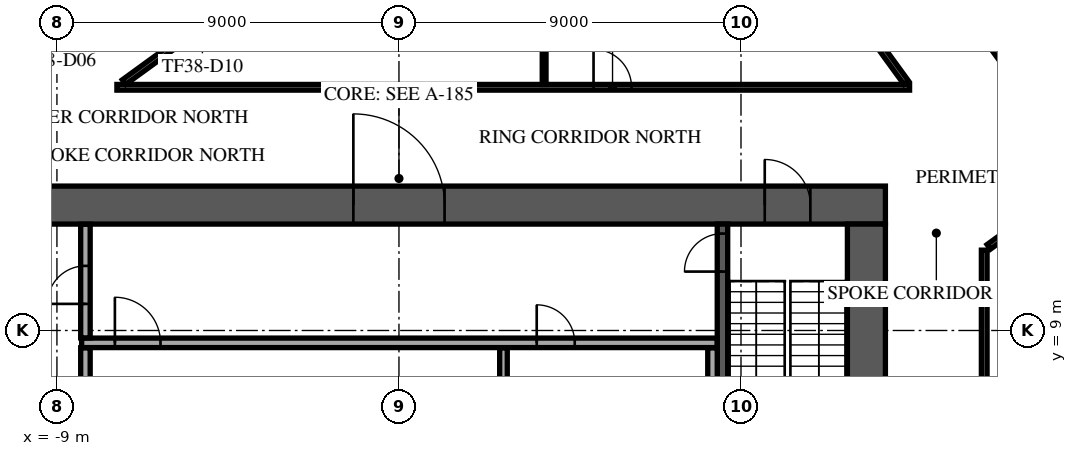
"""IFC4 building model, lengths in metres.
Left out: names, types, materials, properties, quantities, classifications, styles, units other than length and angle.
Written with IfcOpenShell. Run it as: python <this file> out.ifc"""

import sys

from ifc_helpers import new_model, si_unit, direction, frame, frame_2d, origin, place, context, subcontext, project, spatial, rectangle, extrude, element, fill, save


model = new_model("IFC4")
c1 = context("Model", 3, precision=1e-05, world=origin(), true_north=direction((0.0, 1.0)))
c2 = subcontext(c1, "Body", "Model", "MODEL_VIEW")
j1 = project(units=[si_unit("LENGTHUNIT", "METRE"), si_unit("PLANEANGLEUNIT", "RADIAN")], contexts=[c1])
p1 = place(None, origin())
s1 = spatial("IfcSite", under=j1, at=p1, CompositionType="ELEMENT")
p2 = place(p1, origin())
s2 = spatial("IfcBuilding", under=s1, at=p2, CompositionType="ELEMENT")
p3 = place(p2, frame((0.0, 0.0, 163.7)))
s3 = spatial("IfcBuildingStorey", under=s2, at=p3, CompositionType="ELEMENT", Elevation=163.7)
p4 = place(p3, frame((-12.8, 12.3, 0.0), z_axis=(0.0, 0.0, 1.0), x_axis=(1.0, 0.0, 0.0)))
e1 = element("IfcWall", 1, at=p4, inside=s3, PredefinedType="SHEAR", context=c2, shape_type="SweptSolid", body=[
    extrude(rectangle(XDim=25.6, YDim=1.0, at=frame_2d((12.8, 0.0))), origin(), (0.0, 0.0, 1.0), 3.6),
])
p5 = place(p4, frame((11.6, 0.0, 0.0)))
e2 = element("IfcOpeningElement", 2, at=p5, cuts=e1, PredefinedType="OPENING", context=c2, shape_type="SweptSolid", body=[
    extrude(rectangle(XDim=2.4, YDim=2.4, at=frame_2d((1.2, 1.2))), frame((0.0, 0.51, 0.0), z_axis=(0.0, -1.0, 0.0), x_axis=(1.0, 0.0, 0.0)), (0.0, 0.0, 1.0), 1.02),
])
p6 = place(p4, frame((22.425, 0.0, 0.0)))
e3 = element("IfcOpeningElement", 3, at=p6, cuts=e1, PredefinedType="OPENING", context=c2, shape_type="SweptSolid", body=[
    extrude(rectangle(XDim=1.2, YDim=2.1, at=frame_2d((0.6, 1.05))), frame((0.0, 0.51, 0.0), z_axis=(0.0, -1.0, 0.0), x_axis=(1.0, 0.0, 0.0)), (0.0, 0.0, 1.0), 1.02),
])
p7 = place(p4, frame((1.4, 0.0, 0.0)))
e4 = element("IfcOpeningElement", 4, at=p7, cuts=e1, PredefinedType="OPENING", context=c2, shape_type="SweptSolid", body=[
    extrude(rectangle(XDim=1.0, YDim=2.1, at=frame_2d((0.5, 1.05))), frame((0.0, 0.51, 0.0), z_axis=(0.0, -1.0, 0.0), x_axis=(1.0, 0.0, 0.0)), (0.0, 0.0, 1.0), 1.02),
])
p8 = place(p3, frame((12.3, -11.8, 0.0), z_axis=(0.0, 0.0, 1.0), x_axis=(0.0, 1.0, 0.0)))
e5 = element("IfcWall", 5, at=p8, inside=s3, PredefinedType="SHEAR", context=c2, shape_type="SweptSolid", body=[
    extrude(rectangle(XDim=23.6, YDim=1.0, at=frame_2d((11.8, 0.0))), origin(), (0.0, 0.0, 1.0), 3.6),
])
p9 = place(p8, frame((10.6, 0.0, 0.0)))
e6 = element("IfcOpeningElement", 6, at=p9, cuts=e5, PredefinedType="OPENING", context=c2, shape_type="SweptSolid", body=[
    extrude(rectangle(XDim=2.4, YDim=2.4, at=frame_2d((1.2, 1.2))), frame((0.0, 0.51, 0.0), z_axis=(0.0, -1.0, 0.0), x_axis=(1.0, 0.0, 0.0)), (0.0, 0.0, 1.0), 1.02),
])
p10 = place(p3, frame((8.512, 4.55, 0.0), z_axis=(0.0, 0.0, 1.0), x_axis=(0.0, 1.0, 0.0)))
e7 = element("IfcWall", 7, at=p10, inside=s3, PredefinedType="SOLIDWALL", context=c2, shape_type="SweptSolid", body=[
    extrude(rectangle(XDim=7.25, YDim=0.275, at=frame_2d((3.625, 0.0))), origin(), (0.0, 0.0, 1.0), 3.6),
])
p11 = place(p10, frame((6.0, 0.0, 0.0)))
e8 = element("IfcOpeningElement", 8, at=p11, cuts=e7, PredefinedType="OPENING", context=c2, shape_type="SweptSolid", body=[
    extrude(rectangle(XDim=1.0, YDim=2.1, at=frame_2d((0.5, 1.05))), frame((0.0, 0.147, 0.0), z_axis=(0.0, -1.0, 0.0), x_axis=(1.0, 0.0, 0.0)), (0.0, 0.0, 1.0), 0.295),
])
p12 = place(p3, frame((-8.25, 5.855, 0.0), z_axis=(0.0, 0.0, 1.0), x_axis=(0.0, 1.0, 0.0)))
e9 = element("IfcWall", 9, at=p12, inside=s3, PredefinedType="PARTITIONING", context=c2, shape_type="SweptSolid", body=[
    extrude(rectangle(XDim=2.69, YDim=0.25, at=frame_2d((1.345, 0.0))), origin(), (0.0, 0.0, 1.0), 3.6),
])
p13 = place(p3, frame((2.75, 5.855, 0.0), z_axis=(0.0, 0.0, 1.0), x_axis=(0.0, 1.0, 0.0)))
e10 = element("IfcWall", 10, at=p13, inside=s3, PredefinedType="PARTITIONING", context=c2, shape_type="SweptSolid", body=[
    extrude(rectangle(XDim=2.69, YDim=0.2, at=frame_2d((1.345, 0.0))), origin(), (0.0, 0.0, 1.0), 3.6),
])
p14 = place(p3, frame((8.25, 5.855, 0.0), z_axis=(0.0, 0.0, 1.0), x_axis=(0.0, 1.0, 0.0)))
e11 = element("IfcWall", 11, at=p14, inside=s3, PredefinedType="PARTITIONING", context=c2, shape_type="SweptSolid", body=[
    extrude(rectangle(XDim=2.69, YDim=0.25, at=frame_2d((1.345, 0.0))), origin(), (0.0, 0.0, 1.0), 3.6),
])
p15 = place(p3, frame((-8.35, 8.675, 0.0), z_axis=(0.0, 0.0, 1.0), x_axis=(1.0, 0.0, 0.0)))
e12 = element("IfcWall", 12, at=p15, inside=s3, PredefinedType="PARTITIONING", context=c2, shape_type="SweptSolid", body=[
    extrude(rectangle(XDim=16.72, YDim=0.25, at=frame_2d((8.36, 0.0))), origin(), (0.0, 0.0, 1.0), 3.6),
])
p16 = place(p15, frame((0.875, 0.0, 0.0)))
e13 = element("IfcOpeningElement", 13, at=p16, cuts=e12, PredefinedType="OPENING", context=c2, shape_type="SweptSolid", body=[
    extrude(rectangle(XDim=1.2, YDim=2.1, at=frame_2d((0.6, 1.05))), frame((0.0, 0.135, 0.0), z_axis=(0.0, -1.0, 0.0), x_axis=(1.0, 0.0, 0.0)), (0.0, 0.0, 1.0), 0.27),
])
p17 = place(p15, frame((11.975, 0.0, 0.0)))
e14 = element("IfcOpeningElement", 14, at=p17, cuts=e12, PredefinedType="OPENING", context=c2, shape_type="SweptSolid", body=[
    extrude(rectangle(XDim=1.0, YDim=2.1, at=frame_2d((0.5, 1.05))), frame((0.0, 0.135, 0.0), z_axis=(0.0, -1.0, 0.0), x_axis=(1.0, 0.0, 0.0)), (0.0, 0.0, 1.0), 0.27),
])
p18 = place(p3, frame((-8.25, 8.805, 0.0), z_axis=(0.0, 0.0, 1.0), x_axis=(0.0, 1.0, 0.0)))
e15 = element("IfcWall", 15, at=p18, inside=s3, PredefinedType="PARTITIONING", context=c2, shape_type="SweptSolid", body=[
    extrude(rectangle(XDim=2.99, YDim=0.25, at=frame_2d((1.495, 0.0))), origin(), (0.0, 0.0, 1.0), 3.6),
])
p19 = place(p18, frame((0.895, 0.0, 0.0)))
e16 = element("IfcOpeningElement", 16, at=p19, cuts=e15, PredefinedType="OPENING", context=c2, shape_type="SweptSolid", body=[
    extrude(rectangle(XDim=1.0, YDim=2.1, at=frame_2d((0.5, 1.05))), frame((0.0, 0.135, 0.0), z_axis=(0.0, -1.0, 0.0), x_axis=(1.0, 0.0, 0.0)), (0.0, 0.0, 1.0), 0.27),
])
p20 = place(p3, frame((4.48, 35.516, 0.0), z_axis=(0.0, 0.0, 1.0), x_axis=(-0.809018017995, -0.587783843398, 0.0)))
e17 = element("IfcWall", 17, at=p20, inside=s3, PredefinedType="STANDARD", context=c2, shape_type="SweptSolid", body=[
    extrude(rectangle(XDim=49.376, YDim=0.6, at=frame_2d((24.688, 0.0))), origin(), (0.0, 0.0, 1.0), 3.6),
])
p21 = place(p20, frame((1.2, 0.0, 0.9)))
e18 = element("IfcOpeningElement", 18, at=p21, cuts=e17, PredefinedType="OPENING", context=c2, shape_type="SweptSolid", body=[
    extrude(rectangle(XDim=2.1, YDim=2.1, at=frame_2d((1.05, 1.05))), frame((0.0, 0.31, 0.0), z_axis=(0.0, -1.0, 0.0), x_axis=(1.0, 0.0, 0.0)), (0.0, 0.0, 1.0), 0.62),
])
p22 = place(p20, frame((5.7, 0.0, 0.9)))
e19 = element("IfcOpeningElement", 19, at=p22, cuts=e17, PredefinedType="OPENING", context=c2, shape_type="SweptSolid", body=[
    extrude(rectangle(XDim=2.1, YDim=2.1, at=frame_2d((1.05, 1.05))), frame((0.0, 0.31, 0.0), z_axis=(0.0, -1.0, 0.0), x_axis=(1.0, 0.0, 0.0)), (0.0, 0.0, 1.0), 0.62),
])
p23 = place(p20, frame((10.2, 0.0, 0.9)))
e20 = element("IfcOpeningElement", 20, at=p23, cuts=e17, PredefinedType="OPENING", context=c2, shape_type="SweptSolid", body=[
    extrude(rectangle(XDim=2.1, YDim=2.1, at=frame_2d((1.05, 1.05))), frame((0.0, 0.31, 0.0), z_axis=(0.0, -1.0, 0.0), x_axis=(1.0, 0.0, 0.0)), (0.0, 0.0, 1.0), 0.62),
])
p24 = place(p20, frame((14.7, 0.0, 0.9)))
e21 = element("IfcOpeningElement", 21, at=p24, cuts=e17, PredefinedType="OPENING", context=c2, shape_type="SweptSolid", body=[
    extrude(rectangle(XDim=2.1, YDim=2.1, at=frame_2d((1.05, 1.05))), frame((0.0, 0.31, 0.0), z_axis=(0.0, -1.0, 0.0), x_axis=(1.0, 0.0, 0.0)), (0.0, 0.0, 1.0), 0.62),
])
p25 = place(p20, frame((19.2, 0.0, 0.9)))
e22 = element("IfcOpeningElement", 22, at=p25, cuts=e17, PredefinedType="OPENING", context=c2, shape_type="SweptSolid", body=[
    extrude(rectangle(XDim=2.1, YDim=2.1, at=frame_2d((1.05, 1.05))), frame((0.0, 0.31, 0.0), z_axis=(0.0, -1.0, 0.0), x_axis=(1.0, 0.0, 0.0)), (0.0, 0.0, 1.0), 0.62),
])
p26 = place(p20, frame((23.7, 0.0, 0.9)))
e23 = element("IfcOpeningElement", 23, at=p26, cuts=e17, PredefinedType="OPENING", context=c2, shape_type="SweptSolid", body=[
    extrude(rectangle(XDim=2.1, YDim=2.1, at=frame_2d((1.05, 1.05))), frame((0.0, 0.31, 0.0), z_axis=(0.0, -1.0, 0.0), x_axis=(1.0, 0.0, 0.0)), (0.0, 0.0, 1.0), 0.62),
])
p27 = place(p20, frame((28.2, 0.0, 0.9)))
e24 = element("IfcOpeningElement", 24, at=p27, cuts=e17, PredefinedType="OPENING", context=c2, shape_type="SweptSolid", body=[
    extrude(rectangle(XDim=2.1, YDim=2.1, at=frame_2d((1.05, 1.05))), frame((0.0, 0.31, 0.0), z_axis=(0.0, -1.0, 0.0), x_axis=(1.0, 0.0, 0.0)), (0.0, 0.0, 1.0), 0.62),
])
p28 = place(p20, frame((32.7, 0.0, 0.9)))
e25 = element("IfcOpeningElement", 25, at=p28, cuts=e17, PredefinedType="OPENING", context=c2, shape_type="SweptSolid", body=[
    extrude(rectangle(XDim=2.1, YDim=2.1, at=frame_2d((1.05, 1.05))), frame((0.0, 0.31, 0.0), z_axis=(0.0, -1.0, 0.0), x_axis=(1.0, 0.0, 0.0)), (0.0, 0.0, 1.0), 0.62),
])
p29 = place(p20, frame((37.2, 0.0, 0.9)))
e26 = element("IfcOpeningElement", 26, at=p29, cuts=e17, PredefinedType="OPENING", context=c2, shape_type="SweptSolid", body=[
    extrude(rectangle(XDim=2.1, YDim=2.1, at=frame_2d((1.05, 1.05))), frame((0.0, 0.31, 0.0), z_axis=(0.0, -1.0, 0.0), x_axis=(1.0, 0.0, 0.0)), (0.0, 0.0, 1.0), 0.62),
])
p30 = place(p20, frame((41.7, 0.0, 0.9)))
e27 = element("IfcOpeningElement", 27, at=p30, cuts=e17, PredefinedType="OPENING", context=c2, shape_type="SweptSolid", body=[
    extrude(rectangle(XDim=2.1, YDim=2.1, at=frame_2d((1.05, 1.05))), frame((0.0, 0.31, 0.0), z_axis=(0.0, -1.0, 0.0), x_axis=(1.0, 0.0, 0.0)), (0.0, 0.0, 1.0), 0.62),
])
p31 = place(p20, frame((46.138, 0.0, 0.9)))
e28 = element("IfcOpeningElement", 28, at=p31, cuts=e17, PredefinedType="OPENING", context=c2, shape_type="SweptSolid", body=[
    extrude(rectangle(XDim=2.1, YDim=2.1, at=frame_2d((1.05, 1.05))), frame((0.0, 0.31, 0.0), z_axis=(0.0, -1.0, 0.0), x_axis=(1.0, 0.0, 0.0)), (0.0, 0.0, 1.0), 0.62),
])
p32 = place(p3, frame((36.533, 0.245, 0.0), z_axis=(0.0, 0.0, 1.0), x_axis=(-0.58778579343, 0.809016601215, 0.0)))
e29 = element("IfcWall", 29, at=p32, inside=s3, PredefinedType="STANDARD", context=c2, shape_type="SweptSolid", body=[
    extrude(rectangle(XDim=42.176, YDim=0.6, at=frame_2d((21.088, 0.0))), origin(), (0.0, 0.0, 1.0), 3.6),
])
p33 = place(p32, frame((1.138, 0.0, 0.9)))
e30 = element("IfcOpeningElement", 30, at=p33, cuts=e29, PredefinedType="OPENING", context=c2, shape_type="SweptSolid", body=[
    extrude(rectangle(XDim=2.3, YDim=2.1, at=frame_2d((1.15, 1.05))), frame((0.0, 0.31, 0.0), z_axis=(0.0, -1.0, 0.0), x_axis=(1.0, 0.0, 0.0)), (0.0, 0.0, 1.0), 0.62),
])
p34 = place(p32, frame((5.776, 0.0, 0.9)))
e31 = element("IfcOpeningElement", 31, at=p34, cuts=e29, PredefinedType="OPENING", context=c2, shape_type="SweptSolid", body=[
    extrude(rectangle(XDim=2.3, YDim=2.1, at=frame_2d((1.15, 1.05))), frame((0.0, 0.31, 0.0), z_axis=(0.0, -1.0, 0.0), x_axis=(1.0, 0.0, 0.0)), (0.0, 0.0, 1.0), 0.62),
])
p35 = place(p32, frame((10.476, 0.0, 0.9)))
e32 = element("IfcOpeningElement", 32, at=p35, cuts=e29, PredefinedType="OPENING", context=c2, shape_type="SweptSolid", body=[
    extrude(rectangle(XDim=2.3, YDim=2.1, at=frame_2d((1.15, 1.05))), frame((0.0, 0.31, 0.0), z_axis=(0.0, -1.0, 0.0), x_axis=(1.0, 0.0, 0.0)), (0.0, 0.0, 1.0), 0.62),
])
p36 = place(p32, frame((15.176, 0.0, 0.9)))
e33 = element("IfcOpeningElement", 33, at=p36, cuts=e29, PredefinedType="OPENING", context=c2, shape_type="SweptSolid", body=[
    extrude(rectangle(XDim=2.3, YDim=2.1, at=frame_2d((1.15, 1.05))), frame((0.0, 0.31, 0.0), z_axis=(0.0, -1.0, 0.0), x_axis=(1.0, 0.0, 0.0)), (0.0, 0.0, 1.0), 0.62),
])
p37 = place(p32, frame((19.876, 0.0, 0.9)))
e34 = element("IfcOpeningElement", 34, at=p37, cuts=e29, PredefinedType="OPENING", context=c2, shape_type="SweptSolid", body=[
    extrude(rectangle(XDim=2.3, YDim=2.1, at=frame_2d((1.15, 1.05))), frame((0.0, 0.31, 0.0), z_axis=(0.0, -1.0, 0.0), x_axis=(1.0, 0.0, 0.0)), (0.0, 0.0, 1.0), 0.62),
])
p38 = place(p32, frame((24.576, 0.0, 0.9)))
e35 = element("IfcOpeningElement", 35, at=p38, cuts=e29, PredefinedType="OPENING", context=c2, shape_type="SweptSolid", body=[
    extrude(rectangle(XDim=2.3, YDim=2.1, at=frame_2d((1.15, 1.05))), frame((0.0, 0.31, 0.0), z_axis=(0.0, -1.0, 0.0), x_axis=(1.0, 0.0, 0.0)), (0.0, 0.0, 1.0), 0.62),
])
p39 = place(p32, frame((29.276, 0.0, 0.9)))
e36 = element("IfcOpeningElement", 36, at=p39, cuts=e29, PredefinedType="OPENING", context=c2, shape_type="SweptSolid", body=[
    extrude(rectangle(XDim=2.3, YDim=2.1, at=frame_2d((1.15, 1.05))), frame((0.0, 0.31, 0.0), z_axis=(0.0, -1.0, 0.0), x_axis=(1.0, 0.0, 0.0)), (0.0, 0.0, 1.0), 0.62),
])
p40 = place(p32, frame((33.976, 0.0, 0.9)))
e37 = element("IfcOpeningElement", 37, at=p40, cuts=e29, PredefinedType="OPENING", context=c2, shape_type="SweptSolid", body=[
    extrude(rectangle(XDim=2.3, YDim=2.1, at=frame_2d((1.15, 1.05))), frame((0.0, 0.31, 0.0), z_axis=(0.0, -1.0, 0.0), x_axis=(1.0, 0.0, 0.0)), (0.0, 0.0, 1.0), 0.62),
])
p41 = place(p32, frame((38.676, 0.0, 0.9)))
e38 = element("IfcOpeningElement", 38, at=p41, cuts=e29, PredefinedType="OPENING", context=c2, shape_type="SweptSolid", body=[
    extrude(rectangle(XDim=2.3, YDim=2.1, at=frame_2d((1.15, 1.05))), frame((0.0, 0.31, 0.0), z_axis=(0.0, -1.0, 0.0), x_axis=(1.0, 0.0, 0.0)), (0.0, 0.0, 1.0), 0.62),
])
p42 = place(p3, frame((-26.166, 4.749, 0.0), z_axis=(0.0, 0.0, 1.0), x_axis=(0.809023795939, 0.587775890628, 0.0)))
e39 = element("IfcWall", 39, at=p42, inside=s3, PredefinedType="PARTITIONING", context=c2, shape_type="SweptSolid", body=[
    extrude(rectangle(XDim=36.756, YDim=0.15, at=frame_2d((18.378, 0.0))), origin(), (0.0, 0.0, 1.0), 3.15),
])
p43 = place(p42, frame((1.8, 0.0, 0.0)))
e40 = element("IfcOpeningElement", 40, at=p43, cuts=e39, PredefinedType="OPENING", context=c2, shape_type="SweptSolid", body=[
    extrude(rectangle(XDim=1.0, YDim=2.1, at=frame_2d((0.5, 1.05))), frame((0.0, 0.085, 0.0), z_axis=(0.0, -1.0, 0.0), x_axis=(1.0, 0.0, 0.0)), (0.0, 0.0, 1.0), 0.17),
])
p44 = place(p42, frame((7.453, 0.0, 0.0)))
e41 = element("IfcOpeningElement", 41, at=p44, cuts=e39, PredefinedType="OPENING", context=c2, shape_type="SweptSolid", body=[
    extrude(rectangle(XDim=1.0, YDim=2.1, at=frame_2d((0.5, 1.05))), frame((0.0, 0.085, 0.0), z_axis=(0.0, -1.0, 0.0), x_axis=(1.0, 0.0, 0.0)), (0.0, 0.0, 1.0), 0.17),
])
p45 = place(p42, frame((20.671, 0.0, 0.0)))
e42 = element("IfcOpeningElement", 42, at=p45, cuts=e39, PredefinedType="OPENING", context=c2, shape_type="SweptSolid", body=[
    extrude(rectangle(XDim=1.0, YDim=2.1, at=frame_2d((0.5, 1.05))), frame((0.0, 0.085, 0.0), z_axis=(0.0, -1.0, 0.0), x_axis=(1.0, 0.0, 0.0)), (0.0, 0.0, 1.0), 0.17),
])
p46 = place(p42, frame((27.382, 0.0, 0.0)))
e43 = element("IfcOpeningElement", 43, at=p46, cuts=e39, PredefinedType="OPENING", context=c2, shape_type="SweptSolid", body=[
    extrude(rectangle(XDim=1.8, YDim=2.1, at=frame_2d((0.9, 1.05))), frame((0.0, 0.085, 0.0), z_axis=(0.0, -1.0, 0.0), x_axis=(1.0, 0.0, 0.0)), (0.0, 0.0, 1.0), 0.17),
])
p47 = place(p3, frame((-7.422, 15.4, 0.0), z_axis=(0.0, 0.0, 1.0), x_axis=(1.0, 0.0, 0.0)))
e44 = element("IfcWall", 44, at=p47, inside=s3, PredefinedType="PARTITIONING", context=c2, shape_type="SweptSolid", body=[
    extrude(rectangle(XDim=20.858, YDim=0.15, at=frame_2d((10.429, 0.0))), origin(), (0.0, 0.0, 1.0), 3.15),
])
p48 = place(p47, frame((12.542, 0.0, 0.0)))
e45 = element("IfcOpeningElement", 45, at=p48, cuts=e44, PredefinedType="OPENING", context=c2, shape_type="SweptSolid", body=[
    extrude(rectangle(XDim=1.0, YDim=2.1, at=frame_2d((0.5, 1.05))), frame((0.0, 0.085, 0.0), z_axis=(0.0, -1.0, 0.0), x_axis=(1.0, 0.0, 0.0)), (0.0, 0.0, 1.0), 0.17),
])
p49 = place(p3, frame((-7.235, 15.536, 0.0), z_axis=(0.0, 0.0, 1.0), x_axis=(0.809007989402, 0.587797646375, 0.0)))
e46 = element("IfcWall", 46, at=p49, inside=s3, PredefinedType="PARTITIONING", context=c2, shape_type="SweptSolid", body=[
    extrude(rectangle(XDim=15.099, YDim=0.15, at=frame_2d((7.55, 0.0))), origin(), (0.0, 0.0, 1.0), 3.15),
])
p50 = place(p49, frame((2.05, 0.0, 0.0)))
e47 = element("IfcOpeningElement", 47, at=p50, cuts=e46, PredefinedType="OPENING", context=c2, shape_type="SweptSolid", body=[
    extrude(rectangle(XDim=1.0, YDim=2.1, at=frame_2d((0.5, 1.05))), frame((0.0, 0.085, 0.0), z_axis=(0.0, -1.0, 0.0), x_axis=(1.0, 0.0, 0.0)), (0.0, 0.0, 1.0), 0.17),
])
p51 = place(p3, frame((7.739, 23.241, 0.0), z_axis=(0.0, 0.0, 1.0), x_axis=(0.587792950245, -0.809011401429, 0.0)))
e48 = element("IfcWall", 48, at=p51, inside=s3, PredefinedType="PARTITIONING", context=c2, shape_type="SweptSolid", body=[
    extrude(rectangle(XDim=9.545, YDim=0.15, at=frame_2d((4.772, 0.0))), origin(), (0.0, 0.0, 1.0), 3.15),
])
p52 = place(p3, frame((9.681, 24.652, 0.0), z_axis=(0.0, 0.0, 1.0), x_axis=(0.58776328895, -0.809032951222, 0.0)))
e49 = element("IfcWall", 49, at=p52, inside=s3, PredefinedType="PARTITIONING", context=c2, shape_type="SweptSolid", body=[
    extrude(rectangle(XDim=28.583, YDim=0.15, at=frame_2d((14.291, 0.0))), origin(), (0.0, 0.0, 1.0), 3.15),
])
p53 = place(p52, frame((12.256, 0.0, 0.0)))
e50 = element("IfcOpeningElement", 50, at=p53, cuts=e49, PredefinedType="OPENING", context=c2, shape_type="SweptSolid", body=[
    extrude(rectangle(XDim=1.0, YDim=2.1, at=frame_2d((0.5, 1.05))), frame((0.0, 0.085, 0.0), z_axis=(0.0, -1.0, 0.0), x_axis=(1.0, 0.0, 0.0)), (0.0, 0.0, 1.0), 0.17),
])
p54 = place(p3, frame((15.4, -9.457, 0.0), z_axis=(0.0, 0.0, 1.0), x_axis=(0.0, 1.0, 0.0)))
e51 = element("IfcWall", 51, at=p54, inside=s3, PredefinedType="PARTITIONING", context=c2, shape_type="SweptSolid", body=[
    extrude(rectangle(XDim=20.571, YDim=0.15, at=frame_2d((10.285, 0.0))), origin(), (0.0, 0.0, 1.0), 3.15),
])
p55 = place(p54, frame((3.55, 0.0, 0.0)))
e52 = element("IfcOpeningElement", 52, at=p55, cuts=e51, PredefinedType="OPENING", context=c2, shape_type="SweptSolid", body=[
    extrude(rectangle(XDim=1.0, YDim=2.1, at=frame_2d((0.5, 1.05))), frame((0.0, 0.085, 0.0), z_axis=(0.0, -1.0, 0.0), x_axis=(1.0, 0.0, 0.0)), (0.0, 0.0, 1.0), 0.17),
])
p56 = place(p54, frame((7.853, 0.0, 0.0)))
e53 = element("IfcOpeningElement", 53, at=p56, cuts=e51, PredefinedType="OPENING", context=c2, shape_type="SweptSolid", body=[
    extrude(rectangle(XDim=1.8, YDim=2.1, at=frame_2d((0.9, 1.05))), frame((0.0, 0.085, 0.0), z_axis=(0.0, -1.0, 0.0), x_axis=(1.0, 0.0, 0.0)), (0.0, 0.0, 1.0), 0.17),
])
p57 = place(p3, frame((15.519, 11.2, 0.0), z_axis=(0.0, 0.0, 1.0), x_axis=(0.809140088661, 0.587615790225, 0.0)))
e54 = element("IfcWall", 54, at=p57, inside=s3, PredefinedType="PARTITIONING", context=c2, shape_type="SweptSolid", body=[
    extrude(rectangle(XDim=0.784, YDim=0.15, at=frame_2d((0.392, 0.0))), origin(), (0.0, 0.0, 1.0), 3.6),
])
p58 = place(p3, frame((3.82, 15.475, 0.0), z_axis=(0.0, 0.0, 1.0), x_axis=(0.0, 1.0, 0.0)))
e55 = element("IfcWall", 55, at=p58, inside=s3, PredefinedType="PARTITIONING", context=c2, shape_type="SweptSolid", body=[
    extrude(rectangle(XDim=1.847, YDim=0.1, at=frame_2d((0.923, 0.0))), origin(), (0.0, 0.0, 1.0), 3.6),
])
p59 = place(p5, origin())
e56 = element("IfcDoor", 56, at=p59, inside=s3, OperationType="SINGLE_SWING_LEFT", PredefinedType="DOOR", context=c2, shape_type="SweptSolid", body=[
    extrude(rectangle(XDim=2.4, YDim=2.4, at=frame_2d((1.2, 1.2))), frame((0.0, 0.025, 0.0), z_axis=(0.0, -1.0, 0.0), x_axis=(1.0, 0.0, 0.0)), (0.0, 0.0, 1.0), 0.05),
])
fill(e2, e56)
p60 = place(p6, origin())
e57 = element("IfcDoor", 57, at=p60, inside=s3, OperationType="SINGLE_SWING_LEFT", PredefinedType="DOOR", context=c2, shape_type="SweptSolid", body=[
    extrude(rectangle(XDim=1.2, YDim=2.1, at=frame_2d((0.6, 1.05))), frame((0.0, 0.025, 0.0), z_axis=(0.0, -1.0, 0.0), x_axis=(1.0, 0.0, 0.0)), (0.0, 0.0, 1.0), 0.05),
])
fill(e3, e57)
p61 = place(p11, origin())
e58 = element("IfcDoor", 58, at=p61, inside=s3, OperationType="SINGLE_SWING_LEFT", PredefinedType="DOOR", context=c2, shape_type="SweptSolid", body=[
    extrude(rectangle(XDim=1.0, YDim=2.1, at=frame_2d((0.5, 1.05))), frame((0.0, 0.025, 0.0), z_axis=(0.0, -1.0, 0.0), x_axis=(1.0, 0.0, 0.0)), (0.0, 0.0, 1.0), 0.05),
])
fill(e8, e58)
p62 = place(p19, origin())
e59 = element("IfcDoor", 59, at=p62, inside=s3, OperationType="SINGLE_SWING_LEFT", PredefinedType="DOOR", context=c2, shape_type="SweptSolid", body=[
    extrude(rectangle(XDim=1.0, YDim=2.1, at=frame_2d((0.5, 1.05))), frame((0.0, 0.025, 0.0), z_axis=(0.0, -1.0, 0.0), x_axis=(1.0, 0.0, 0.0)), (0.0, 0.0, 1.0), 0.05),
])
fill(e16, e59)
p63 = place(p16, origin())
e60 = element("IfcDoor", 60, at=p63, inside=s3, OperationType="SINGLE_SWING_LEFT", PredefinedType="DOOR", context=c2, shape_type="SweptSolid", body=[
    extrude(rectangle(XDim=1.2, YDim=2.1, at=frame_2d((0.6, 1.05))), frame((0.0, 0.025, 0.0), z_axis=(0.0, -1.0, 0.0), x_axis=(1.0, 0.0, 0.0)), (0.0, 0.0, 1.0), 0.05),
])
fill(e13, e60)
p64 = place(p17, origin())
e61 = element("IfcDoor", 61, at=p64, inside=s3, OperationType="SINGLE_SWING_LEFT", PredefinedType="DOOR", context=c2, shape_type="SweptSolid", body=[
    extrude(rectangle(XDim=1.0, YDim=2.1, at=frame_2d((0.5, 1.05))), frame((0.0, 0.025, 0.0), z_axis=(0.0, -1.0, 0.0), x_axis=(1.0, 0.0, 0.0)), (0.0, 0.0, 1.0), 0.05),
])
fill(e14, e61)
p65 = place(p48, origin())
e62 = element("IfcDoor", 62, at=p65, inside=s3, OperationType="SINGLE_SWING_LEFT", PredefinedType="DOOR", context=c2, shape_type="SweptSolid", body=[
    extrude(rectangle(XDim=1.0, YDim=2.1, at=frame_2d((0.5, 1.05))), frame((0.0, 0.025, 0.0), z_axis=(0.0, -1.0, 0.0), x_axis=(1.0, 0.0, 0.0)), (0.0, 0.0, 1.0), 0.05),
])
fill(e45, e62)
save(model, sys.argv[1])
